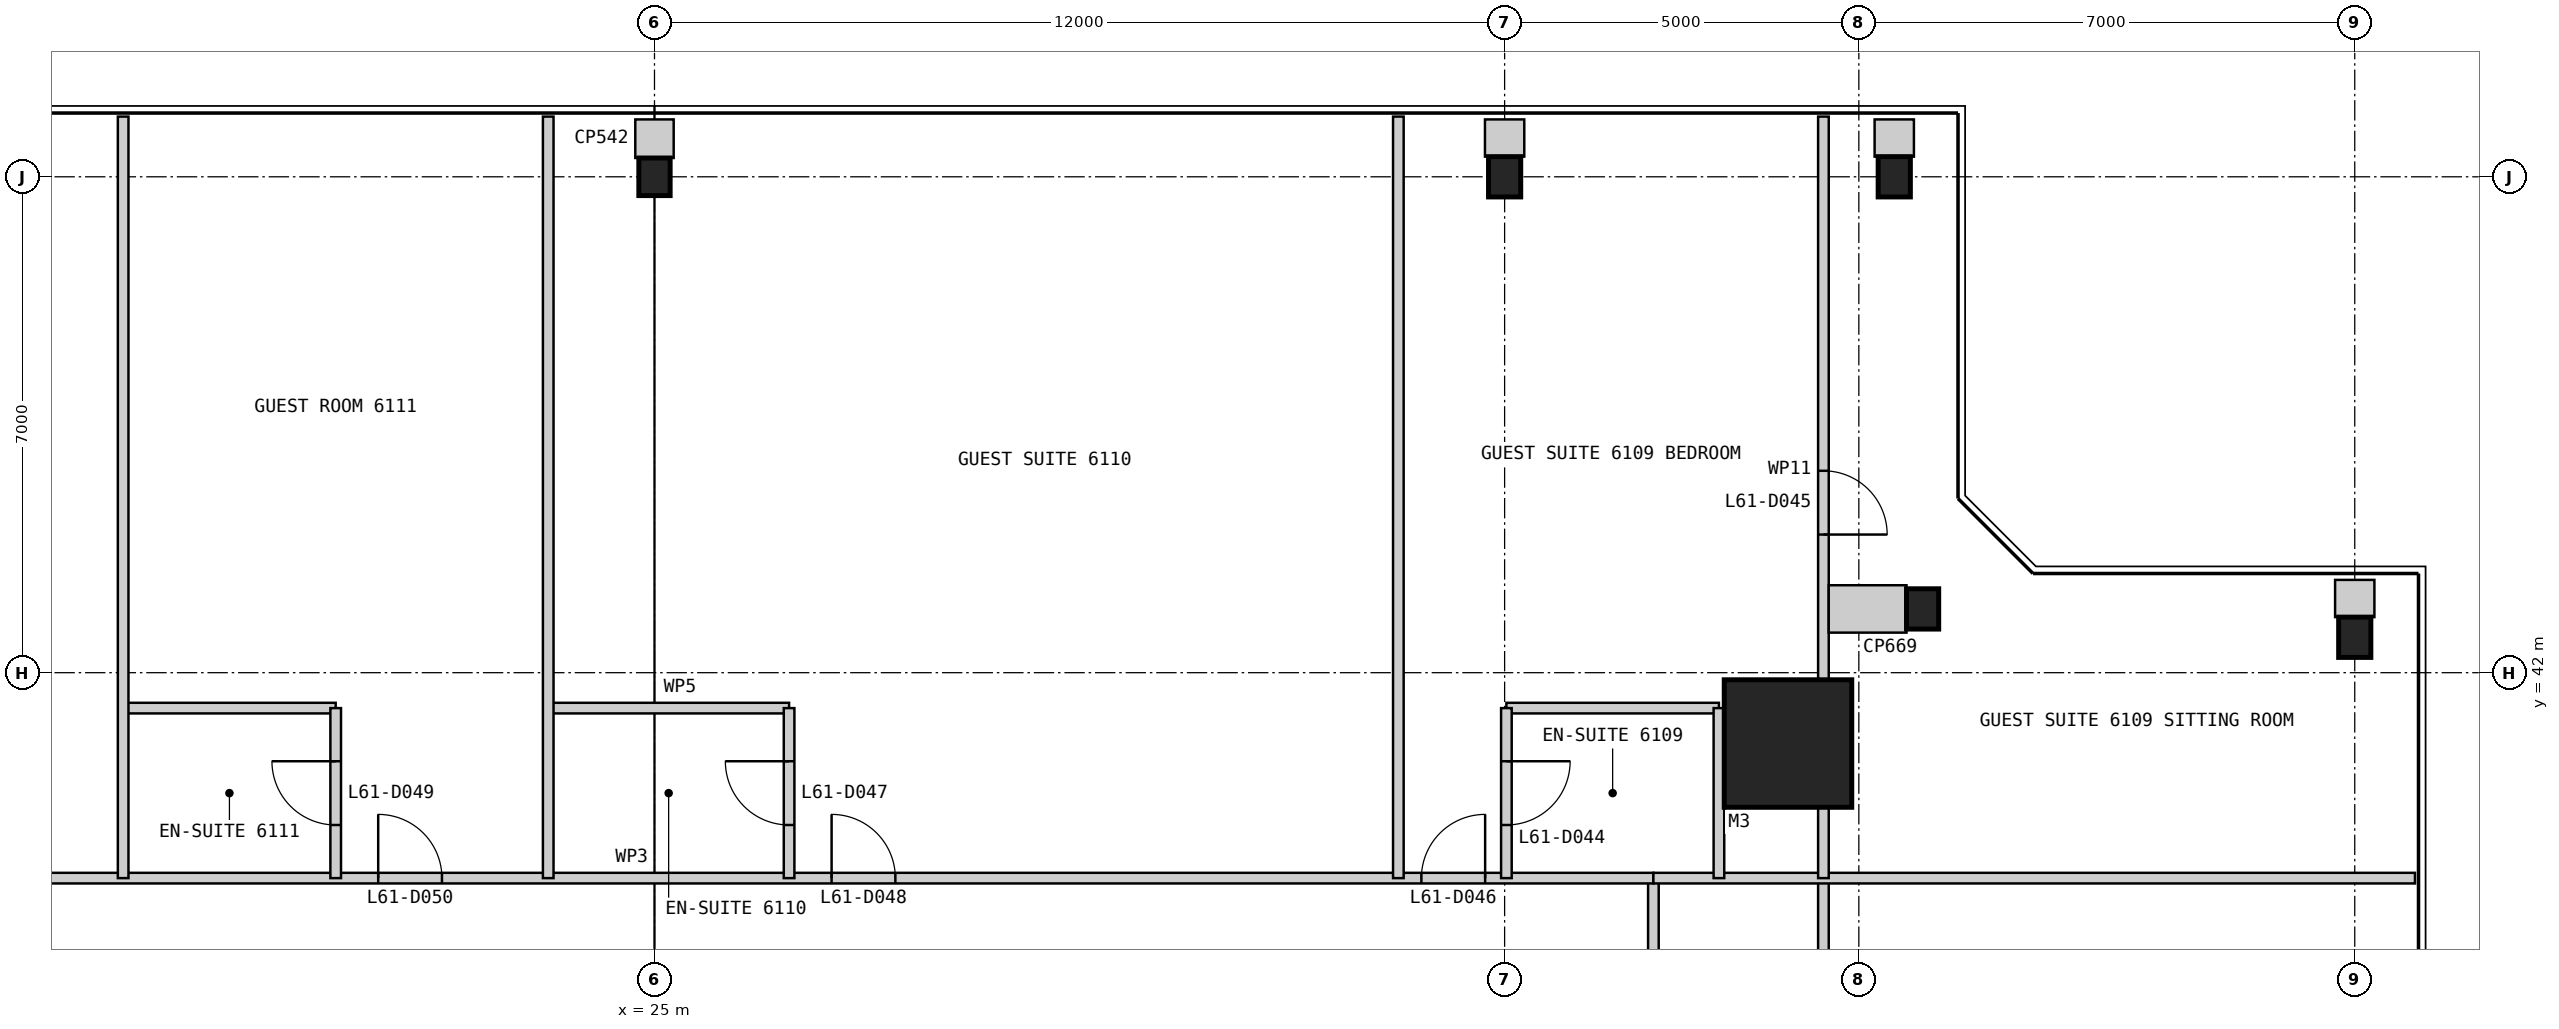
"""IFC4 building model, lengths in metres.
Left out: names, types, materials, properties, quantities, classifications, styles, units other than length and angle.
Written with IfcOpenShell. Run it as: python <this file> out.ifc"""

import sys

from ifc_helpers import new_model, si_unit, direction, frame, frame_2d, origin, origin_2d, place, context, subcontext, project, spatial, rectangle, i_section, extrude, element, fill, save


model = new_model("IFC4")
c1 = context("Model", 3, precision=1e-05, world=origin(), true_north=direction((0.0, 1.0)))
c2 = subcontext(c1, "Body", "Model", "MODEL_VIEW")
j1 = project(units=[si_unit("LENGTHUNIT", "METRE"), si_unit("PLANEANGLEUNIT", "RADIAN")], contexts=[c1])
p1 = place(None, origin())
s1 = spatial("IfcSite", under=j1, at=p1, CompositionType="ELEMENT")
p2 = place(p1, origin())
s2 = spatial("IfcBuilding", under=s1, at=p2, CompositionType="ELEMENT")
p3 = place(p2, frame((0.0, 0.0, 259.4)))
s3 = spatial("IfcBuildingStorey", under=s2, at=p3, CompositionType="ELEMENT", Elevation=259.4)
p4 = place(p3, frame((41.0, 41.0, 0.0), z_axis=(0.0, 0.0, 1.0), x_axis=(1.0, 0.0, 0.0)))
e1 = element("IfcColumn", 1, at=p4, inside=s3, PredefinedType="COLUMN", context=c2, shape_type="SweptSolid", body=[
    extrude(rectangle(XDim=1.8, YDim=1.8, at=origin_2d()), origin(), (0.0, 0.0, 1.0), 3.4),
])
for number, where, z_axis, x_axis in (
    (2, (49.0, 42.5, 0.0), (0.0, 0.0, 1.0), (1.0, 0.0, 0.0)),
    (3, (42.9, 42.9, 0.0), (0.0, 0.0, 1.0), (1.0, 0.0, 0.0)),
    (4, (42.5, 49.0, 0.0), (0.0, 0.0, 1.0), (1.0, 0.0, 0.0)),
    (5, (37.0, 49.0, 0.0), (0.0, 0.0, 1.0), (1.0, 0.0, 0.0)),
):
    element("IfcColumn", number, at=place(p3, frame(where, z_axis=z_axis, x_axis=x_axis)), inside=s3, PredefinedType="COLUMN", context=c2, shape_type="SweptSolid", body=[
        extrude(i_section(OverallWidth=0.455, OverallDepth=0.569, WebThickness=0.078, FlangeThickness=0.125, at=origin_2d()), origin(), (0.0, 0.0, 1.0), 3.4),
    ])
p5 = place(p3, frame((25.0, 49.0, 0.0), z_axis=(0.0, 0.0, 1.0), x_axis=(1.0, 0.0, 0.0)))
e6 = element("IfcColumn", 6, at=p5, inside=s3, PredefinedType="COLUMN", context=c2, shape_type="SweptSolid", body=[
    extrude(i_section(OverallWidth=0.442, OverallDepth=0.531, WebThickness=0.066, FlangeThickness=0.106, at=origin_2d()), origin(), (0.0, 0.0, 1.0), 3.4),
])
p6 = place(p3, frame((39.1, 10.9, 0.0), z_axis=(0.0, 0.0, 1.0), x_axis=(0.0, 1.0, 0.0)))
e7 = element("IfcWall", 7, at=p6, inside=s3, PredefinedType="PARTITIONING", context=c2, shape_type="SweptSolid", body=[
    extrude(rectangle(XDim=28.2, YDim=0.15, at=frame_2d((14.1, 0.0))), origin(), (0.0, 0.0, 1.0), 3.25),
])
p7 = place(p6, frame((2.375, 0.0, 0.0)))
e8 = element("IfcOpeningElement", 8, at=p7, cuts=e7, PredefinedType="OPENING", context=c2, shape_type="SweptSolid", body=[
    extrude(rectangle(XDim=0.9, YDim=2.1, at=frame_2d((0.45, 1.05))), frame((0.0, 0.085, 0.0), z_axis=(0.0, -1.0, 0.0), x_axis=(1.0, 0.0, 0.0)), (0.0, 0.0, 1.0), 0.17),
])
p8 = place(p6, frame((10.7, 0.0, 0.0)))
e9 = element("IfcOpeningElement", 9, at=p8, cuts=e7, PredefinedType="OPENING", context=c2, shape_type="SweptSolid", body=[
    extrude(rectangle(XDim=0.9, YDim=2.1, at=frame_2d((0.45, 1.05))), frame((0.0, 0.085, 0.0), z_axis=(0.0, -1.0, 0.0), x_axis=(1.0, 0.0, 0.0)), (0.0, 0.0, 1.0), 0.17),
])
p9 = place(p6, frame((17.1, 0.0, 0.0)))
e10 = element("IfcOpeningElement", 10, at=p9, cuts=e7, PredefinedType="OPENING", context=c2, shape_type="SweptSolid", body=[
    extrude(rectangle(XDim=0.9, YDim=2.1, at=frame_2d((0.45, 1.05))), frame((0.0, 0.085, 0.0), z_axis=(0.0, -1.0, 0.0), x_axis=(1.0, 0.0, 0.0)), (0.0, 0.0, 1.0), 0.17),
])
p10 = place(p6, frame((23.7, 0.0, 0.0)))
e11 = element("IfcOpeningElement", 11, at=p10, cuts=e7, PredefinedType="OPENING", context=c2, shape_type="SweptSolid", body=[
    extrude(rectangle(XDim=0.9, YDim=2.1, at=frame_2d((0.45, 1.05))), frame((0.0, 0.085, 0.0), z_axis=(0.0, -1.0, 0.0), x_axis=(1.0, 0.0, 0.0)), (0.0, 0.0, 1.0), 0.17),
])
p11 = place(p3, frame((41.5, 36.1, 0.0), z_axis=(0.0, 0.0, 1.0), x_axis=(0.0, 1.0, 0.0)))
e12 = element("IfcWall", 12, at=p11, inside=s3, PredefinedType="PARTITIONING", context=c2, shape_type="SweptSolid", body=[
    extrude(rectangle(XDim=3.0, YDim=0.15, at=frame_2d((1.5, 0.0))), origin(), (0.0, 0.0, 1.0), 3.25),
])
p12 = place(p3, frame((39.1, 39.1, 0.0), z_axis=(0.0, 0.0, 1.0), x_axis=(-1.0, 0.0, 0.0)))
e13 = element("IfcWall", 13, at=p12, inside=s3, PredefinedType="PARTITIONING", context=c2, shape_type="SweptSolid", body=[
    extrude(rectangle(XDim=28.2, YDim=0.15, at=frame_2d((14.1, 0.0))), origin(), (0.0, 0.0, 1.0), 3.25),
])
p13 = place(p12, frame((2.375, 0.0, 0.0)))
e14 = element("IfcOpeningElement", 14, at=p13, cuts=e13, PredefinedType="OPENING", context=c2, shape_type="SweptSolid", body=[
    extrude(rectangle(XDim=0.9, YDim=2.1, at=frame_2d((0.45, 1.05))), frame((0.0, 0.085, 0.0), z_axis=(0.0, -1.0, 0.0), x_axis=(1.0, 0.0, 0.0)), (0.0, 0.0, 1.0), 0.17),
])
p14 = place(p12, frame((10.7, 0.0, 0.0)))
e15 = element("IfcOpeningElement", 15, at=p14, cuts=e13, PredefinedType="OPENING", context=c2, shape_type="SweptSolid", body=[
    extrude(rectangle(XDim=0.9, YDim=2.1, at=frame_2d((0.45, 1.05))), frame((0.0, 0.085, 0.0), z_axis=(0.0, -1.0, 0.0), x_axis=(1.0, 0.0, 0.0)), (0.0, 0.0, 1.0), 0.17),
])
p15 = place(p12, frame((17.1, 0.0, 0.0)))
e16 = element("IfcOpeningElement", 16, at=p15, cuts=e13, PredefinedType="OPENING", context=c2, shape_type="SweptSolid", body=[
    extrude(rectangle(XDim=0.9, YDim=2.1, at=frame_2d((0.45, 1.05))), frame((0.0, 0.085, 0.0), z_axis=(0.0, -1.0, 0.0), x_axis=(1.0, 0.0, 0.0)), (0.0, 0.0, 1.0), 0.17),
])
p16 = place(p12, frame((23.4, 0.0, 0.0)))
e17 = element("IfcOpeningElement", 17, at=p16, cuts=e13, PredefinedType="OPENING", context=c2, shape_type="SweptSolid", body=[
    extrude(rectangle(XDim=1.0, YDim=2.1, at=frame_2d((0.5, 1.05))), frame((0.0, 0.085, 0.0), z_axis=(0.0, -1.0, 0.0), x_axis=(1.0, 0.0, 0.0)), (0.0, 0.0, 1.0), 0.17),
])
p17 = place(p3, frame((49.85, 39.1, 0.0), z_axis=(0.0, 0.0, 1.0), x_axis=(-1.0, 0.0, 0.0)))
e18 = element("IfcWall", 18, at=p17, inside=s3, PredefinedType="PARTITIONING", context=c2, shape_type="SweptSolid", body=[
    extrude(rectangle(XDim=10.75, YDim=0.15, at=frame_2d((5.375, 0.0))), origin(), (0.0, 0.0, 1.0), 3.25),
])
p18 = place(p3, frame((40.025, 41.5, 0.0), z_axis=(0.0, 0.0, 1.0), x_axis=(-1.0, 0.0, 0.0)))
e19 = element("IfcWall", 19, at=p18, inside=s3, PredefinedType="PARTITIONING", context=c2, shape_type="SweptSolid", body=[
    extrude(rectangle(XDim=3.0, YDim=0.15, at=frame_2d((1.5, 0.0))), origin(), (0.0, 0.0, 1.0), 3.25),
])
p19 = place(p3, frame((37.025, 41.5, 0.0), z_axis=(0.0, 0.0, 1.0), x_axis=(0.0, -1.0, 0.0)))
e20 = element("IfcWall", 20, at=p19, inside=s3, PredefinedType="PARTITIONING", context=c2, shape_type="SweptSolid", body=[
    extrude(rectangle(XDim=2.4, YDim=0.15, at=frame_2d((1.2, 0.0))), origin(), (0.0, 0.0, 1.0), 2.628),
])
p20 = place(p19, frame((0.75, 0.0, 0.0)))
e21 = element("IfcOpeningElement", 21, at=p20, cuts=e20, PredefinedType="OPENING", context=c2, shape_type="SweptSolid", body=[
    extrude(rectangle(XDim=0.9, YDim=2.1, at=frame_2d((0.45, 1.05))), frame((0.0, 0.085, 0.0), z_axis=(0.0, -1.0, 0.0), x_axis=(1.0, 0.0, 0.0)), (0.0, 0.0, 1.0), 0.17),
])
p21 = place(p3, frame((40.025, 41.5, 0.0), z_axis=(0.0, 0.0, 1.0), x_axis=(0.0, -1.0, 0.0)))
e22 = element("IfcWall", 22, at=p21, inside=s3, PredefinedType="PARTITIONING", context=c2, shape_type="SweptSolid", body=[
    extrude(rectangle(XDim=2.4, YDim=0.15, at=frame_2d((1.2, 0.0))), origin(), (0.0, 0.0, 1.0), 3.25),
])
p22 = place(p3, frame((41.5, 49.85, 0.0), z_axis=(0.0, 0.0, 1.0), x_axis=(0.0, -1.0, 0.0)))
e23 = element("IfcWall", 23, at=p22, inside=s3, PredefinedType="PARTITIONING", context=c2, shape_type="SweptSolid", body=[
    extrude(rectangle(XDim=10.75, YDim=0.15, at=frame_2d((5.375, 0.0))), origin(), (0.0, 0.0, 1.0), 3.25),
])
p23 = place(p22, frame((5.0, 0.0, 0.0)))
e24 = element("IfcOpeningElement", 24, at=p23, cuts=e23, PredefinedType="OPENING", context=c2, shape_type="SweptSolid", body=[
    extrude(rectangle(XDim=0.9, YDim=2.1, at=frame_2d((0.45, 1.05))), frame((0.0, 0.085, 0.0), z_axis=(0.0, -1.0, 0.0), x_axis=(1.0, 0.0, 0.0)), (0.0, 0.0, 1.0), 0.17),
])
p24 = place(p3, frame((35.5, 49.85, 0.0), z_axis=(0.0, 0.0, 1.0), x_axis=(0.0, -1.0, 0.0)))
e25 = element("IfcWall", 25, at=p24, inside=s3, PredefinedType="PARTITIONING", context=c2, shape_type="SweptSolid", body=[
    extrude(rectangle(XDim=10.75, YDim=0.15, at=frame_2d((5.375, 0.0))), origin(), (0.0, 0.0, 1.0), 3.25),
])
p25 = place(p3, frame((26.9, 41.5, 0.0), z_axis=(0.0, 0.0, 1.0), x_axis=(-1.0, 0.0, 0.0)))
e26 = element("IfcWall", 26, at=p25, inside=s3, PredefinedType="PARTITIONING", context=c2, shape_type="SweptSolid", body=[
    extrude(rectangle(XDim=3.4, YDim=0.15, at=frame_2d((1.7, 0.0))), origin(), (0.0, 0.0, 1.0), 3.25),
])
p26 = place(p3, frame((26.9, 41.5, 0.0), z_axis=(0.0, 0.0, 1.0), x_axis=(0.0, -1.0, 0.0)))
e27 = element("IfcWall", 27, at=p26, inside=s3, PredefinedType="PARTITIONING", context=c2, shape_type="SweptSolid", body=[
    extrude(rectangle(XDim=2.4, YDim=0.15, at=frame_2d((1.2, 0.0))), origin(), (0.0, 0.0, 1.0), 3.25),
])
p27 = place(p26, frame((0.75, 0.0, 0.0)))
e28 = element("IfcOpeningElement", 28, at=p27, cuts=e27, PredefinedType="OPENING", context=c2, shape_type="SweptSolid", body=[
    extrude(rectangle(XDim=0.9, YDim=2.1, at=frame_2d((0.45, 1.05))), frame((0.0, 0.085, 0.0), z_axis=(0.0, -1.0, 0.0), x_axis=(1.0, 0.0, 0.0)), (0.0, 0.0, 1.0), 0.17),
])
p28 = place(p3, frame((23.5, 49.85, 0.0), z_axis=(0.0, 0.0, 1.0), x_axis=(0.0, -1.0, 0.0)))
e29 = element("IfcWall", 29, at=p28, inside=s3, PredefinedType="PARTITIONING", context=c2, shape_type="SweptSolid", body=[
    extrude(rectangle(XDim=10.75, YDim=0.15, at=frame_2d((5.375, 0.0))), origin(), (0.0, 0.0, 1.0), 3.25),
])
p29 = place(p3, frame((20.5, 41.5, 0.0), z_axis=(0.0, 0.0, 1.0), x_axis=(-1.0, 0.0, 0.0)))
e30 = element("IfcWall", 30, at=p29, inside=s3, PredefinedType="PARTITIONING", context=c2, shape_type="SweptSolid", body=[
    extrude(rectangle(XDim=3.0, YDim=0.15, at=frame_2d((1.5, 0.0))), origin(), (0.0, 0.0, 1.0), 3.25),
])
p30 = place(p3, frame((20.5, 41.5, 0.0), z_axis=(0.0, 0.0, 1.0), x_axis=(0.0, -1.0, 0.0)))
e31 = element("IfcWall", 31, at=p30, inside=s3, PredefinedType="PARTITIONING", context=c2, shape_type="SweptSolid", body=[
    extrude(rectangle(XDim=2.4, YDim=0.15, at=frame_2d((1.2, 0.0))), origin(), (0.0, 0.0, 1.0), 3.25),
])
p31 = place(p30, frame((0.75, 0.0, 0.0)))
e32 = element("IfcOpeningElement", 32, at=p31, cuts=e31, PredefinedType="OPENING", context=c2, shape_type="SweptSolid", body=[
    extrude(rectangle(XDim=0.9, YDim=2.1, at=frame_2d((0.45, 1.05))), frame((0.0, 0.085, 0.0), z_axis=(0.0, -1.0, 0.0), x_axis=(1.0, 0.0, 0.0)), (0.0, 0.0, 1.0), 0.17),
])
p32 = place(p3, frame((17.5, 49.85, 0.0), z_axis=(0.0, 0.0, 1.0), x_axis=(0.0, -1.0, 0.0)))
e33 = element("IfcWall", 33, at=p32, inside=s3, PredefinedType="PARTITIONING", context=c2, shape_type="SweptSolid", body=[
    extrude(rectangle(XDim=10.75, YDim=0.15, at=frame_2d((5.375, 0.0))), origin(), (0.0, 0.0, 1.0), 3.25),
])
p33 = place(p3, frame((49.0, 43.31, 0.0), z_axis=(0.0, 0.0, 1.0), x_axis=(0.0, -1.0, 0.0)))
e34 = element("IfcWall", 34, at=p33, inside=s3, PredefinedType="PARTITIONING", context=c2, shape_type="SweptSolid", body=[
    extrude(rectangle(XDim=0.526, YDim=0.555, at=frame_2d((0.263, 0.0))), origin(), (0.0, 0.0, 1.0), 3.25),
])
p34 = place(p3, frame((41.575, 42.9, 0.0), z_axis=(0.0, 0.0, 1.0), x_axis=(1.0, 0.0, 0.0)))
e35 = element("IfcWall", 35, at=p34, inside=s3, PredefinedType="PARTITIONING", context=c2, shape_type="SweptSolid", body=[
    extrude(rectangle(XDim=1.098, YDim=0.669, at=frame_2d((0.549, 0.0))), origin(), (0.0, 0.0, 1.0), 3.25),
])
for number, where, z_axis, x_axis in (
    (36, (42.5, 49.81, 0.0), (0.0, 0.0, 1.0), (0.0, -1.0, 0.0)),
    (37, (37.0, 49.81, 0.0), (0.0, 0.0, 1.0), (0.0, -1.0, 0.0)),
):
    element("IfcWall", number, at=place(p3, frame(where, z_axis=z_axis, x_axis=x_axis)), inside=s3, PredefinedType="PARTITIONING", context=c2, shape_type="SweptSolid", body=[
        extrude(rectangle(XDim=0.526, YDim=0.555, at=frame_2d((0.263, 0.0))), origin(), (0.0, 0.0, 1.0), 3.25),
    ])
p35 = place(p3, frame((25.0, 49.81, 0.0), z_axis=(0.0, 0.0, 1.0), x_axis=(0.0, -1.0, 0.0)))
e38 = element("IfcWall", 38, at=p35, inside=s3, PredefinedType="PARTITIONING", context=c2, shape_type="SweptSolid", body=[
    extrude(rectangle(XDim=0.545, YDim=0.542, at=frame_2d((0.272, 0.0))), origin(), (0.0, 0.0, 1.0), 3.25),
])
p36 = place(p20, origin())
e39 = element("IfcDoor", 39, at=p36, inside=s3, OperationType="SINGLE_SWING_LEFT", PredefinedType="DOOR", context=c2, shape_type="SweptSolid", body=[
    extrude(rectangle(XDim=0.9, YDim=2.1, at=frame_2d((0.45, 1.05))), frame((0.0, 0.025, 0.0), z_axis=(0.0, -1.0, 0.0), x_axis=(1.0, 0.0, 0.0)), (0.0, 0.0, 1.0), 0.05),
])
fill(e21, e39)
p37 = place(p23, origin())
e40 = element("IfcDoor", 40, at=p37, inside=s3, OperationType="SINGLE_SWING_RIGHT", PredefinedType="DOOR", context=c2, shape_type="SweptSolid", body=[
    extrude(rectangle(XDim=0.9, YDim=2.1, at=frame_2d((0.45, 1.05))), frame((0.0, 0.025, 0.0), z_axis=(0.0, -1.0, 0.0), x_axis=(1.0, 0.0, 0.0)), (0.0, 0.0, 1.0), 0.05),
])
fill(e24, e40)
p38 = place(p13, frame((0.9, 0.0, 0.0), z_axis=(0.0, 0.0, 1.0), x_axis=(-1.0, 0.0, 0.0)))
e41 = element("IfcDoor", 41, at=p38, inside=s3, OperationType="SINGLE_SWING_RIGHT", PredefinedType="DOOR", context=c2, shape_type="SweptSolid", body=[
    extrude(rectangle(XDim=0.9, YDim=2.1, at=frame_2d((0.45, 1.05))), frame((0.0, 0.025, 0.0), z_axis=(0.0, -1.0, 0.0), x_axis=(1.0, 0.0, 0.0)), (0.0, 0.0, 1.0), 0.05),
])
fill(e14, e41)
p39 = place(p27, frame((0.9, 0.0, 0.0), z_axis=(0.0, 0.0, 1.0), x_axis=(-1.0, 0.0, 0.0)))
e42 = element("IfcDoor", 42, at=p39, inside=s3, OperationType="SINGLE_SWING_RIGHT", PredefinedType="DOOR", context=c2, shape_type="SweptSolid", body=[
    extrude(rectangle(XDim=0.9, YDim=2.1, at=frame_2d((0.45, 1.05))), frame((0.0, 0.025, 0.0), z_axis=(0.0, -1.0, 0.0), x_axis=(1.0, 0.0, 0.0)), (0.0, 0.0, 1.0), 0.05),
])
fill(e28, e42)
p40 = place(p14, frame((0.9, 0.0, 0.0), z_axis=(0.0, 0.0, 1.0), x_axis=(-1.0, 0.0, 0.0)))
e43 = element("IfcDoor", 43, at=p40, inside=s3, OperationType="SINGLE_SWING_LEFT", PredefinedType="DOOR", context=c2, shape_type="SweptSolid", body=[
    extrude(rectangle(XDim=0.9, YDim=2.1, at=frame_2d((0.45, 1.05))), frame((0.0, 0.025, 0.0), z_axis=(0.0, -1.0, 0.0), x_axis=(1.0, 0.0, 0.0)), (0.0, 0.0, 1.0), 0.05),
])
fill(e15, e43)
p41 = place(p31, frame((0.9, 0.0, 0.0), z_axis=(0.0, 0.0, 1.0), x_axis=(-1.0, 0.0, 0.0)))
e44 = element("IfcDoor", 44, at=p41, inside=s3, OperationType="SINGLE_SWING_RIGHT", PredefinedType="DOOR", context=c2, shape_type="SweptSolid", body=[
    extrude(rectangle(XDim=0.9, YDim=2.1, at=frame_2d((0.45, 1.05))), frame((0.0, 0.025, 0.0), z_axis=(0.0, -1.0, 0.0), x_axis=(1.0, 0.0, 0.0)), (0.0, 0.0, 1.0), 0.05),
])
fill(e32, e44)
p42 = place(p15, frame((0.9, 0.0, 0.0), z_axis=(0.0, 0.0, 1.0), x_axis=(-1.0, 0.0, 0.0)))
e45 = element("IfcDoor", 45, at=p42, inside=s3, OperationType="SINGLE_SWING_LEFT", PredefinedType="DOOR", context=c2, shape_type="SweptSolid", body=[
    extrude(rectangle(XDim=0.9, YDim=2.1, at=frame_2d((0.45, 1.05))), frame((0.0, 0.025, 0.0), z_axis=(0.0, -1.0, 0.0), x_axis=(1.0, 0.0, 0.0)), (0.0, 0.0, 1.0), 0.05),
])
fill(e16, e45)
save(model, sys.argv[1])
